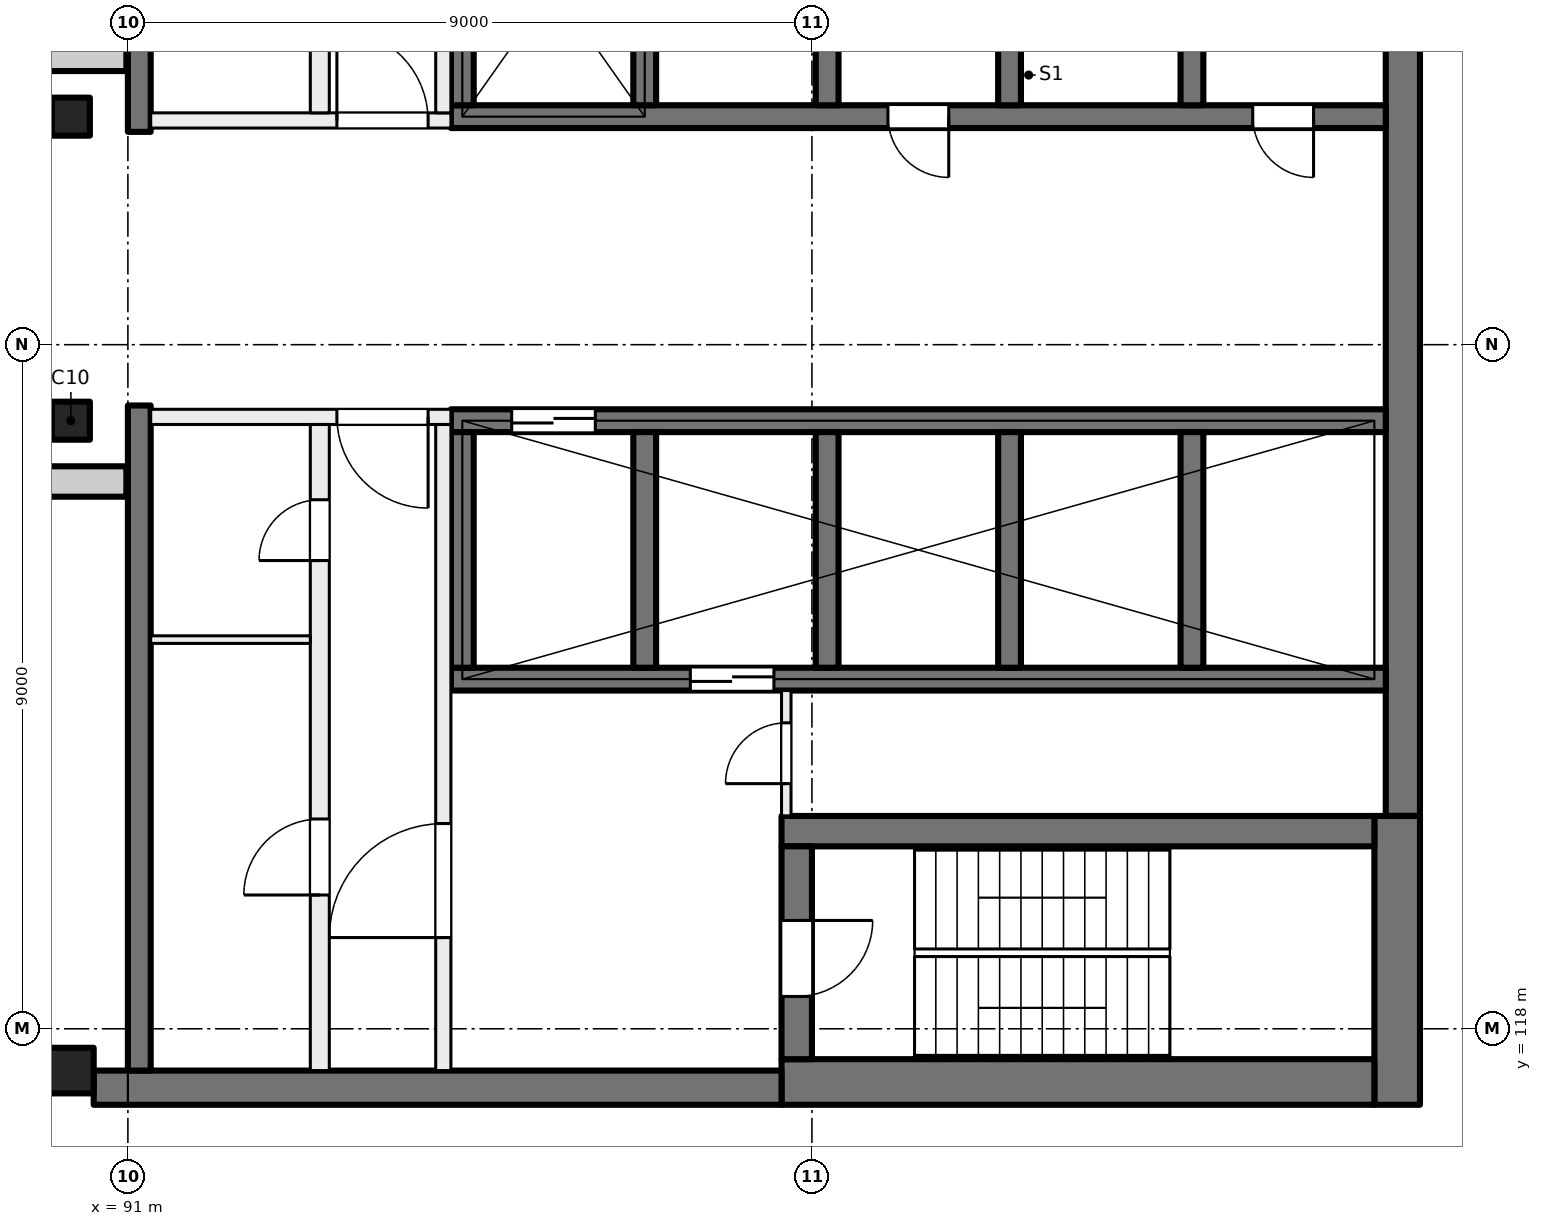
"""IFC4 building model, lengths in metres.
Left out: names, types, materials, properties, quantities, classifications, styles, units other than length and angle.
Written with IfcOpenShell. Run it as: python <this file> out.ifc"""

import sys

from ifc_helpers import new_model, si_unit, direction, frame, frame_2d, origin, origin_2d, place, context, subcontext, project, spatial, rectangle, extrude, element, fill, save


model = new_model("IFC4")
c1 = context("Model", 3, precision=1e-05, world=origin(), true_north=direction((0.0, 1.0)))
c2 = subcontext(c1, "Body", "Model", "MODEL_VIEW")
j1 = project(units=[si_unit("LENGTHUNIT", "METRE"), si_unit("PLANEANGLEUNIT", "RADIAN")], contexts=[c1])
p1 = place(None, origin())
s1 = spatial("IfcSite", under=j1, at=p1, CompositionType="ELEMENT")
p2 = place(p1, origin())
s2 = spatial("IfcBuilding", under=s1, at=p2, CompositionType="ELEMENT")
p3 = place(p2, frame((0.0, 0.0, 282.0)))
s3 = spatial("IfcBuildingStorey", under=s2, at=p3, CompositionType="ELEMENT", Elevation=282.0)
for number, where, z_axis, x_axis in (
    (1, (90.25, 130.0, 0.0), (0.0, 0.0, 1.0), (1.0, 0.0, 0.0)),
    (2, (90.25, 126.0, 0.0), (0.0, 0.0, 1.0), (1.0, 0.0, 0.0)),
):
    element("IfcColumn", number, at=place(p3, frame(where, z_axis=z_axis, x_axis=x_axis)), inside=s3, PredefinedType="COLUMN", context=c2, shape_type="SweptSolid", body=[
        extrude(rectangle(XDim=0.5, YDim=0.5, at=origin_2d()), origin(), (0.0, 0.0, 1.0), 4.5),
    ])
p4 = place(p3, frame((90.25, 117.45, 0.0), z_axis=(0.0, 0.0, 1.0), x_axis=(1.0, 0.0, 0.0)))
e3 = element("IfcColumn", 3, at=p4, inside=s3, PredefinedType="COLUMN", context=c2, shape_type="SweptSolid", body=[
    extrude(rectangle(XDim=0.6, YDim=0.6, at=origin_2d()), origin(), (0.0, 0.0, 1.0), 4.5),
])
p5 = place(p3, frame((107.775, 135.2, 0.0), z_axis=(0.0, 0.0, 1.0), x_axis=(0.0, -1.0, 0.0)))
e4 = element("IfcWall", 4, at=p5, inside=s3, PredefinedType="SHEAR", context=c2, shape_type="SweptSolid", body=[
    extrude(rectangle(XDim=14.4, YDim=0.45, at=frame_2d((7.2, 0.0))), origin(), (0.0, 0.0, 1.0), 4.5),
])
p6 = place(p3, frame((107.7, 120.8, 0.0), z_axis=(0.0, 0.0, 1.0), x_axis=(0.0, -1.0, 0.0)))
e5 = element("IfcWall", 5, at=p6, inside=s3, PredefinedType="SHEAR", context=c2, shape_type="SweptSolid", body=[
    extrude(rectangle(XDim=3.8, YDim=0.6, at=frame_2d((1.9, 0.0))), origin(), (0.0, 0.0, 1.0), 4.5),
])
p7 = place(p3, frame((107.4, 117.3, 0.0), z_axis=(0.0, 0.0, 1.0), x_axis=(-1.0, 0.0, 0.0)))
e6 = element("IfcWall", 6, at=p7, inside=s3, PredefinedType="SHEAR", context=c2, shape_type="SweptSolid", body=[
    extrude(rectangle(XDim=7.8, YDim=0.6, at=frame_2d((3.9, 0.0))), origin(), (0.0, 0.0, 1.0), 4.5),
])
p8 = place(p3, frame((99.6, 117.225, 0.0), z_axis=(0.0, 0.0, 1.0), x_axis=(-1.0, 0.0, 0.0)))
e7 = element("IfcWall", 7, at=p8, inside=s3, PredefinedType="SHEAR", context=c2, shape_type="SweptSolid", body=[
    extrude(rectangle(XDim=9.05, YDim=0.45, at=frame_2d((4.525, 0.0))), origin(), (0.0, 0.0, 1.0), 4.5),
])
p9 = place(p3, frame((107.4, 120.6, 0.0), z_axis=(0.0, 0.0, 1.0), x_axis=(-1.0, 0.0, 0.0)))
e8 = element("IfcWall", 8, at=p9, inside=s3, PredefinedType="SHEAR", context=c2, shape_type="SweptSolid", body=[
    extrude(rectangle(XDim=7.8, YDim=0.4, at=frame_2d((3.9, 0.0))), origin(), (0.0, 0.0, 1.0), 4.5),
])
p10 = place(p3, frame((99.8, 120.4, 0.0), z_axis=(0.0, 0.0, 1.0), x_axis=(0.0, -1.0, 0.0)))
e9 = element("IfcWall", 9, at=p10, inside=s3, PredefinedType="SHEAR", context=c2, shape_type="SweptSolid", body=[
    extrude(rectangle(XDim=2.8, YDim=0.4, at=frame_2d((1.4, 0.0))), origin(), (0.0, 0.0, 1.0), 4.5),
])
p11 = place(p10, frame((0.975, 0.0, 0.0)))
e10 = element("IfcOpeningElement", 10, at=p11, cuts=e9, PredefinedType="OPENING", context=c2, shape_type="SweptSolid", body=[
    extrude(rectangle(XDim=1.0, YDim=2.1, at=frame_2d((0.5, 1.05))), frame((0.0, 0.21, 0.0), z_axis=(0.0, -1.0, 0.0), x_axis=(1.0, 0.0, 0.0)), (0.0, 0.0, 1.0), 0.42),
])
p12 = place(p3, frame((107.55, 130.0, 0.0), z_axis=(0.0, 0.0, 1.0), x_axis=(-1.0, 0.0, 0.0)))
e11 = element("IfcWall", 11, at=p12, inside=s3, PredefinedType="SHEAR", context=c2, shape_type="SweptSolid", body=[
    extrude(rectangle(XDim=12.3, YDim=0.3, at=frame_2d((6.15, 0.0))), origin(), (0.0, 0.0, 1.0), 4.5),
])
p13 = place(p12, frame((0.95, 0.0, 0.0)))
e12 = element("IfcOpeningElement", 12, at=p13, cuts=e11, PredefinedType="OPENING", context=c2, shape_type="SweptSolid", body=[
    extrude(rectangle(XDim=0.8, YDim=2.1, at=frame_2d((0.4, 1.05))), frame((0.0, 0.16, 0.0), z_axis=(0.0, -1.0, 0.0), x_axis=(1.0, 0.0, 0.0)), (0.0, 0.0, 1.0), 0.32),
])
p14 = place(p12, frame((5.75, 0.0, 0.0)))
e13 = element("IfcOpeningElement", 13, at=p14, cuts=e11, PredefinedType="OPENING", context=c2, shape_type="SweptSolid", body=[
    extrude(rectangle(XDim=0.8, YDim=2.1, at=frame_2d((0.4, 1.05))), frame((0.0, 0.16, 0.0), z_axis=(0.0, -1.0, 0.0), x_axis=(1.0, 0.0, 0.0)), (0.0, 0.0, 1.0), 0.32),
])
for number, where, z_axis, x_axis in (
    (14, (105.0, 133.25, 0.0), (0.0, 0.0, 1.0), (0.0, -1.0, 0.0)),
    (15, (102.6, 133.25, 0.0), (0.0, 0.0, 1.0), (0.0, -1.0, 0.0)),
    (16, (100.2, 133.25, 0.0), (0.0, 0.0, 1.0), (0.0, -1.0, 0.0)),
    (17, (97.8, 133.25, 0.0), (0.0, 0.0, 1.0), (0.0, -1.0, 0.0)),
    (18, (95.4, 133.25, 0.0), (0.0, 0.0, 1.0), (0.0, -1.0, 0.0)),
):
    element("IfcWall", number, at=place(p3, frame(where, z_axis=z_axis, x_axis=x_axis)), inside=s3, PredefinedType="SHEAR", context=c2, shape_type="SweptSolid", body=[
        extrude(rectangle(XDim=3.1, YDim=0.3, at=frame_2d((1.55, 0.0))), origin(), (0.0, 0.0, 1.0), 4.5),
    ])
p15 = place(p3, frame((107.55, 126.0, 0.0), z_axis=(0.0, 0.0, 1.0), x_axis=(-1.0, 0.0, 0.0)))
e19 = element("IfcWall", 19, at=p15, inside=s3, PredefinedType="SHEAR", context=c2, shape_type="SweptSolid", body=[
    extrude(rectangle(XDim=12.3, YDim=0.3, at=frame_2d((6.15, 0.0))), origin(), (0.0, 0.0, 1.0), 4.5),
])
p16 = place(p15, frame((10.4, 0.0, 0.0)))
e20 = element("IfcOpeningElement", 20, at=p16, cuts=e19, PredefinedType="OPENING", context=c2, shape_type="SweptSolid", body=[
    extrude(rectangle(XDim=1.1, YDim=2.1, at=frame_2d((0.55, 1.05))), frame((0.0, 0.16, 0.0), z_axis=(0.0, -1.0, 0.0), x_axis=(1.0, 0.0, 0.0)), (0.0, 0.0, 1.0), 0.32),
])
p17 = place(p3, frame((107.55, 122.6, 0.0), z_axis=(0.0, 0.0, 1.0), x_axis=(-1.0, 0.0, 0.0)))
e21 = element("IfcWall", 21, at=p17, inside=s3, PredefinedType="SHEAR", context=c2, shape_type="SweptSolid", body=[
    extrude(rectangle(XDim=12.3, YDim=0.3, at=frame_2d((6.15, 0.0))), origin(), (0.0, 0.0, 1.0), 4.5),
])
p18 = place(p17, frame((8.05, 0.0, 0.0)))
e22 = element("IfcOpeningElement", 22, at=p18, cuts=e21, PredefinedType="OPENING", context=c2, shape_type="SweptSolid", body=[
    extrude(rectangle(XDim=1.1, YDim=2.1, at=frame_2d((0.55, 1.05))), frame((0.0, 0.16, 0.0), z_axis=(0.0, -1.0, 0.0), x_axis=(1.0, 0.0, 0.0)), (0.0, 0.0, 1.0), 0.32),
])
for number, where, z_axis, x_axis in (
    (23, (105.0, 125.85, 0.0), (0.0, 0.0, 1.0), (0.0, -1.0, 0.0)),
    (24, (102.6, 125.85, 0.0), (0.0, 0.0, 1.0), (0.0, -1.0, 0.0)),
    (25, (100.2, 125.85, 0.0), (0.0, 0.0, 1.0), (0.0, -1.0, 0.0)),
    (26, (97.8, 125.85, 0.0), (0.0, 0.0, 1.0), (0.0, -1.0, 0.0)),
    (27, (95.4, 125.85, 0.0), (0.0, 0.0, 1.0), (0.0, -1.0, 0.0)),
):
    element("IfcWall", number, at=place(p3, frame(where, z_axis=z_axis, x_axis=x_axis)), inside=s3, PredefinedType="SHEAR", context=c2, shape_type="SweptSolid", body=[
        extrude(rectangle(XDim=3.1, YDim=0.3, at=frame_2d((1.55, 0.0))), origin(), (0.0, 0.0, 1.0), 4.5),
    ])
for number, where, z_axis, x_axis in (
    (28, (91.15, 138.55, 0.0), (0.0, 0.0, 1.0), (0.0, -1.0, 0.0)),
    (29, (91.15, 126.2, 0.0), (0.0, 0.0, 1.0), (0.0, -1.0, 0.0)),
):
    element("IfcWall", number, at=place(p3, frame(where, z_axis=z_axis, x_axis=x_axis)), inside=s3, PredefinedType="SHEAR", context=c2, shape_type="SweptSolid", body=[
        extrude(rectangle(XDim=8.75, YDim=0.3, at=frame_2d((4.375, 0.0))), origin(), (0.0, 0.0, 1.0), 4.5),
    ])
p19 = place(p3, frame((90.98, 125.2, 0.0), z_axis=(0.0, 0.0, 1.0), x_axis=(-1.0, 0.0, 0.0)))
e30 = element("IfcWall", 30, at=p19, inside=s3, PredefinedType="SOLIDWALL", context=c2, shape_type="SweptSolid", body=[
    extrude(rectangle(XDim=38.48, YDim=0.4, at=frame_2d((19.24, 0.0))), origin(), (0.0, 0.0, 1.0), 4.125),
])
p20 = place(p3, frame((72.42, 130.8, 0.0), z_axis=(0.0, 0.0, 1.0), x_axis=(1.0, 0.0, 0.0)))
e31 = element("IfcWall", 31, at=p20, inside=s3, PredefinedType="SOLIDWALL", context=c2, shape_type="SweptSolid", body=[
    extrude(rectangle(XDim=18.56, YDim=0.4, at=frame_2d((9.28, 0.0))), origin(), (0.0, 0.0, 1.0), 4.125),
])
p21 = place(p3, frame((95.25, 126.05, 0.0), z_axis=(0.0, 0.0, 1.0), x_axis=(-1.0, 0.0, 0.0)))
e32 = element("IfcWall", 32, at=p21, inside=s3, PredefinedType="PARTITIONING", context=c2, shape_type="SweptSolid", body=[
    extrude(rectangle(XDim=3.95, YDim=0.2, at=frame_2d((1.975, 0.0))), origin(), (0.0, 0.0, 1.0), 4.125),
])
p22 = place(p21, frame((0.3, 0.0, 0.0)))
e33 = element("IfcOpeningElement", 33, at=p22, cuts=e32, PredefinedType="OPENING", context=c2, shape_type="SweptSolid", body=[
    extrude(rectangle(XDim=1.2, YDim=2.1, at=frame_2d((0.6, 1.05))), frame((0.0, 0.11, 0.0), z_axis=(0.0, -1.0, 0.0), x_axis=(1.0, 0.0, 0.0)), (0.0, 0.0, 1.0), 0.22),
])
p23 = place(p3, frame((95.15, 117.45, 0.0), z_axis=(0.0, 0.0, 1.0), x_axis=(0.0, 1.0, 0.0)))
e34 = element("IfcWall", 34, at=p23, inside=s3, PredefinedType="PARTITIONING", context=c2, shape_type="SweptSolid", body=[
    extrude(rectangle(XDim=8.5, YDim=0.2, at=frame_2d((4.25, 0.0))), origin(), (0.0, 0.0, 1.0), 4.125),
])
p24 = place(p23, frame((1.75, 0.0, 0.0)))
e35 = element("IfcOpeningElement", 35, at=p24, cuts=e34, PredefinedType="OPENING", context=c2, shape_type="SweptSolid", body=[
    extrude(rectangle(XDim=1.5, YDim=2.1, at=frame_2d((0.75, 1.05))), frame((0.0, 0.11, 0.0), z_axis=(0.0, -1.0, 0.0), x_axis=(1.0, 0.0, 0.0)), (0.0, 0.0, 1.0), 0.22),
])
p25 = place(p3, frame((93.525, 117.45, 0.0), z_axis=(0.0, 0.0, 1.0), x_axis=(0.0, 1.0, 0.0)))
e36 = element("IfcWall", 36, at=p25, inside=s3, PredefinedType="PARTITIONING", context=c2, shape_type="SweptSolid", body=[
    extrude(rectangle(XDim=8.5, YDim=0.25, at=frame_2d((4.25, 0.0))), origin(), (0.0, 0.0, 1.0), 4.125),
])
p26 = place(p25, frame((6.71, 0.0, 0.0)))
e37 = element("IfcOpeningElement", 37, at=p26, cuts=e36, PredefinedType="OPENING", context=c2, shape_type="SweptSolid", body=[
    extrude(rectangle(XDim=0.8, YDim=2.1, at=frame_2d((0.4, 1.05))), frame((0.0, 0.135, 0.0), z_axis=(0.0, -1.0, 0.0), x_axis=(1.0, 0.0, 0.0)), (0.0, 0.0, 1.0), 0.27),
])
p27 = place(p25, frame((2.31, 0.0, 0.0)))
e38 = element("IfcOpeningElement", 38, at=p27, cuts=e36, PredefinedType="OPENING", context=c2, shape_type="SweptSolid", body=[
    extrude(rectangle(XDim=1.0, YDim=2.1, at=frame_2d((0.5, 1.05))), frame((0.0, 0.135, 0.0), z_axis=(0.0, -1.0, 0.0), x_axis=(1.0, 0.0, 0.0)), (0.0, 0.0, 1.0), 0.27),
])
p28 = place(p3, frame((99.663, 120.8, 0.0), z_axis=(0.0, 0.0, 1.0), x_axis=(0.0, 1.0, 0.0)))
e39 = element("IfcWall", 39, at=p28, inside=s3, PredefinedType="PARTITIONING", context=c2, shape_type="SweptSolid", body=[
    extrude(rectangle(XDim=1.65, YDim=0.125, at=frame_2d((0.825, 0.0))), origin(), (0.0, 0.0, 1.0), 4.125),
])
p29 = place(p28, frame((0.425, 0.0, 0.0)))
e40 = element("IfcOpeningElement", 40, at=p29, cuts=e39, PredefinedType="OPENING", context=c2, shape_type="SweptSolid", body=[
    extrude(rectangle(XDim=0.8, YDim=2.1, at=frame_2d((0.4, 1.05))), frame((0.0, 0.073, 0.0), z_axis=(0.0, -1.0, 0.0), x_axis=(1.0, 0.0, 0.0)), (0.0, 0.0, 1.0), 0.145),
])
p30 = place(p3, frame((93.4, 123.12, 0.0), z_axis=(0.0, 0.0, 1.0), x_axis=(-1.0, 0.0, 0.0)))
e41 = element("IfcWall", 41, at=p30, inside=s3, PredefinedType="PARTITIONING", context=c2, shape_type="SweptSolid", body=[
    extrude(rectangle(XDim=2.1, YDim=0.1, at=frame_2d((1.05, 0.0))), origin(), (0.0, 0.0, 1.0), 4.125),
])
p31 = place(p3, frame((91.3, 129.95, 0.0), z_axis=(0.0, 0.0, 1.0), x_axis=(1.0, 0.0, 0.0)))
e42 = element("IfcWall", 42, at=p31, inside=s3, PredefinedType="PARTITIONING", context=c2, shape_type="SweptSolid", body=[
    extrude(rectangle(XDim=3.95, YDim=0.2, at=frame_2d((1.975, 0.0))), origin(), (0.0, 0.0, 1.0), 4.125),
])
p32 = place(p31, frame((2.45, 0.0, 0.0)))
e43 = element("IfcOpeningElement", 43, at=p32, cuts=e42, PredefinedType="OPENING", context=c2, shape_type="SweptSolid", body=[
    extrude(rectangle(XDim=1.2, YDim=2.1, at=frame_2d((0.6, 1.05))), frame((0.0, 0.11, 0.0), z_axis=(0.0, -1.0, 0.0), x_axis=(1.0, 0.0, 0.0)), (0.0, 0.0, 1.0), 0.22),
])
p33 = place(p3, frame((95.15, 130.05, 0.0), z_axis=(0.0, 0.0, 1.0), x_axis=(0.0, 1.0, 0.0)))
e44 = element("IfcWall", 44, at=p33, inside=s3, PredefinedType="PARTITIONING", context=c2, shape_type="SweptSolid", body=[
    extrude(rectangle(XDim=8.5, YDim=0.2, at=frame_2d((4.25, 0.0))), origin(), (0.0, 0.0, 1.0), 4.125),
])
p34 = place(p33, frame((5.25, 0.0, 0.0)))
e45 = element("IfcOpeningElement", 45, at=p34, cuts=e44, PredefinedType="OPENING", context=c2, shape_type="SweptSolid", body=[
    extrude(rectangle(XDim=1.5, YDim=2.1, at=frame_2d((0.75, 1.05))), frame((0.0, 0.11, 0.0), z_axis=(0.0, -1.0, 0.0), x_axis=(1.0, 0.0, 0.0)), (0.0, 0.0, 1.0), 0.22),
])
p35 = place(p3, frame((93.525, 130.05, 0.0), z_axis=(0.0, 0.0, 1.0), x_axis=(0.0, 1.0, 0.0)))
e46 = element("IfcWall", 46, at=p35, inside=s3, PredefinedType="PARTITIONING", context=c2, shape_type="SweptSolid", body=[
    extrude(rectangle(XDim=8.5, YDim=0.25, at=frame_2d((4.25, 0.0))), origin(), (0.0, 0.0, 1.0), 4.125),
])
p36 = place(p35, frame((3.85, 0.0, 0.0)))
e47 = element("IfcOpeningElement", 47, at=p36, cuts=e46, PredefinedType="OPENING", context=c2, shape_type="SweptSolid", body=[
    extrude(rectangle(XDim=0.8, YDim=2.1, at=frame_2d((0.4, 1.05))), frame((0.0, 0.135, 0.0), z_axis=(0.0, -1.0, 0.0), x_axis=(1.0, 0.0, 0.0)), (0.0, 0.0, 1.0), 0.27),
])
p37 = place(p16, origin())
e48 = element("IfcDoor", 48, at=p37, inside=s3, OperationType="DOUBLE_DOOR_SLIDING", PredefinedType="DOOR", context=c2, shape_type="SweptSolid", body=[
    extrude(rectangle(XDim=1.1, YDim=2.1, at=frame_2d((0.55, 1.05))), frame((0.0, 0.025, 0.0), z_axis=(0.0, -1.0, 0.0), x_axis=(1.0, 0.0, 0.0)), (0.0, 0.0, 1.0), 0.05),
])
fill(e20, e48)
p38 = place(p13, origin())
e49 = element("IfcDoor", 49, at=p38, inside=s3, OperationType="SINGLE_SWING_LEFT", PredefinedType="DOOR", context=c2, shape_type="SweptSolid", body=[
    extrude(rectangle(XDim=0.8, YDim=2.1, at=frame_2d((0.4, 1.05))), frame((0.0, 0.025, 0.0), z_axis=(0.0, -1.0, 0.0), x_axis=(1.0, 0.0, 0.0)), (0.0, 0.0, 1.0), 0.05),
])
fill(e12, e49)
p39 = place(p14, origin())
e50 = element("IfcDoor", 50, at=p39, inside=s3, OperationType="SINGLE_SWING_RIGHT", PredefinedType="DOOR", context=c2, shape_type="SweptSolid", body=[
    extrude(rectangle(XDim=0.8, YDim=2.1, at=frame_2d((0.4, 1.05))), frame((0.0, 0.025, 0.0), z_axis=(0.0, -1.0, 0.0), x_axis=(1.0, 0.0, 0.0)), (0.0, 0.0, 1.0), 0.05),
])
fill(e13, e50)
p40 = place(p22, origin())
e51 = element("IfcDoor", 51, at=p40, inside=s3, OperationType="DOUBLE_DOOR_SINGLE_SWING", PredefinedType="DOOR", context=c2, shape_type="SweptSolid", body=[
    extrude(rectangle(XDim=1.2, YDim=2.1, at=frame_2d((0.6, 1.05))), frame((0.0, 0.025, 0.0), z_axis=(0.0, -1.0, 0.0), x_axis=(1.0, 0.0, 0.0)), (0.0, 0.0, 1.0), 0.05),
])
fill(e33, e51)
p41 = place(p24, origin())
e52 = element("IfcDoor", 52, at=p41, inside=s3, OperationType="DOUBLE_DOOR_SINGLE_SWING", PredefinedType="DOOR", context=c2, shape_type="SweptSolid", body=[
    extrude(rectangle(XDim=1.5, YDim=2.1, at=frame_2d((0.75, 1.05))), frame((0.0, 0.025, 0.0), z_axis=(0.0, -1.0, 0.0), x_axis=(1.0, 0.0, 0.0)), (0.0, 0.0, 1.0), 0.05),
])
fill(e35, e52)
p42 = place(p11, origin())
e53 = element("IfcDoor", 53, at=p42, inside=s3, OperationType="SINGLE_SWING_LEFT", PredefinedType="DOOR", context=c2, shape_type="SweptSolid", body=[
    extrude(rectangle(XDim=1.0, YDim=2.1, at=frame_2d((0.5, 1.05))), frame((0.0, 0.025, 0.0), z_axis=(0.0, -1.0, 0.0), x_axis=(1.0, 0.0, 0.0)), (0.0, 0.0, 1.0), 0.05),
])
fill(e10, e53)
p43 = place(p29, origin())
e54 = element("IfcDoor", 54, at=p43, inside=s3, OperationType="SINGLE_SWING_RIGHT", PredefinedType="DOOR", context=c2, shape_type="SweptSolid", body=[
    extrude(rectangle(XDim=0.8, YDim=2.1, at=frame_2d((0.4, 1.05))), frame((0.0, 0.025, 0.0), z_axis=(0.0, -1.0, 0.0), x_axis=(1.0, 0.0, 0.0)), (0.0, 0.0, 1.0), 0.05),
])
fill(e40, e54)
p44 = place(p26, origin())
e55 = element("IfcDoor", 55, at=p44, inside=s3, OperationType="SINGLE_SWING_LEFT", PredefinedType="DOOR", context=c2, shape_type="SweptSolid", body=[
    extrude(rectangle(XDim=0.8, YDim=2.1, at=frame_2d((0.4, 1.05))), frame((0.0, 0.025, 0.0), z_axis=(0.0, -1.0, 0.0), x_axis=(1.0, 0.0, 0.0)), (0.0, 0.0, 1.0), 0.05),
])
fill(e37, e55)
p45 = place(p27, origin())
e56 = element("IfcDoor", 56, at=p45, inside=s3, OperationType="SINGLE_SWING_RIGHT", PredefinedType="DOOR", context=c2, shape_type="SweptSolid", body=[
    extrude(rectangle(XDim=1.0, YDim=2.1, at=frame_2d((0.5, 1.05))), frame((0.0, 0.025, 0.0), z_axis=(0.0, -1.0, 0.0), x_axis=(1.0, 0.0, 0.0)), (0.0, 0.0, 1.0), 0.05),
])
fill(e38, e56)
p46 = place(p32, origin())
e57 = element("IfcDoor", 57, at=p46, inside=s3, OperationType="DOUBLE_DOOR_SINGLE_SWING", PredefinedType="DOOR", context=c2, shape_type="SweptSolid", body=[
    extrude(rectangle(XDim=1.2, YDim=2.1, at=frame_2d((0.6, 1.05))), frame((0.0, 0.025, 0.0), z_axis=(0.0, -1.0, 0.0), x_axis=(1.0, 0.0, 0.0)), (0.0, 0.0, 1.0), 0.05),
])
fill(e43, e57)
p47 = place(p18, origin())
e58 = element("IfcDoor", 58, at=p47, inside=s3, OperationType="DOUBLE_DOOR_SLIDING", PredefinedType="DOOR", context=c2, shape_type="SweptSolid", body=[
    extrude(rectangle(XDim=1.1, YDim=2.1, at=frame_2d((0.55, 1.05))), frame((0.0, 0.025, 0.0), z_axis=(0.0, -1.0, 0.0), x_axis=(1.0, 0.0, 0.0)), (0.0, 0.0, 1.0), 0.05),
])
fill(e22, e58)
save(model, sys.argv[1])
